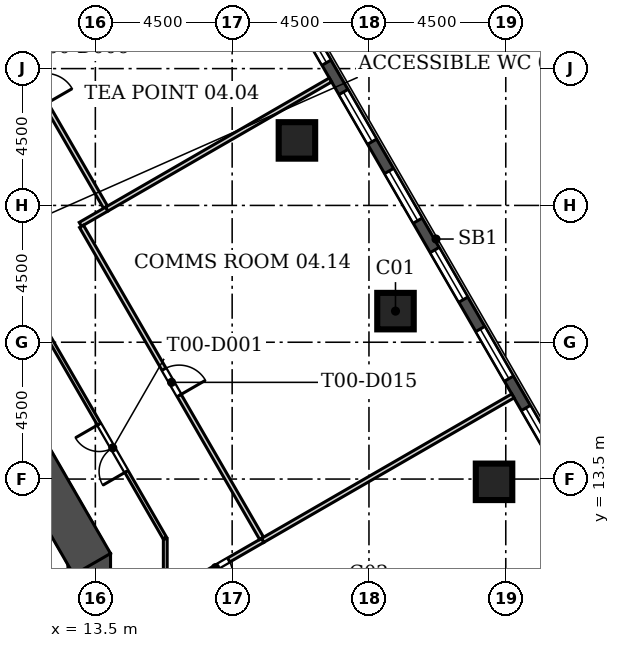
"""IFC4 building model, lengths in metres.
Left out: names, types, materials, properties, quantities, classifications, styles, units other than length and angle.
Written with IfcOpenShell. Run it as: python <this file> out.ifc"""

import sys

from ifc_helpers import new_model, si_unit, direction, frame, frame_2d, origin, origin_2d, place, context, subcontext, project, spatial, rectangle, extrude, element, fill, save


model = new_model("IFC4")
c1 = context("Model", 3, precision=1e-05, world=origin(), true_north=direction((0.0, 1.0)))
c2 = subcontext(c1, "Body", "Model", "MODEL_VIEW")
j1 = project(units=[si_unit("LENGTHUNIT", "METRE"), si_unit("PLANEANGLEUNIT", "RADIAN")], contexts=[c1])
p1 = place(None, origin())
s1 = spatial("IfcSite", under=j1, at=p1, CompositionType="ELEMENT")
p2 = place(p1, origin())
s2 = spatial("IfcBuilding", under=s1, at=p2, CompositionType="ELEMENT")
p3 = place(p2, frame((0.0, 0.0, 25.0)))
s3 = spatial("IfcBuildingStorey", under=s2, at=p3, CompositionType="ELEMENT", Elevation=25.0)
for number, where, z_axis, x_axis in (
    (1, (26.614, 13.409, 0.0), (0.0, 0.0, 1.0), (1.0, 0.0, 0.0)),
    (2, (23.373, 19.024, 0.0), (0.0, 0.0, 1.0), (1.0, 0.0, 0.0)),
    (3, (20.131, 24.638, 0.0), (0.0, 0.0, 1.0), (1.0, 0.0, 0.0)),
):
    element("IfcColumn", number, at=place(p3, frame(where, z_axis=z_axis, x_axis=x_axis)), inside=s3, PredefinedType="COLUMN", context=c2, shape_type="SweptSolid", body=[
        extrude(rectangle(XDim=1.2, YDim=1.2, at=origin_2d()), origin(), (0.0, 0.0, 1.0), 4.5),
    ])
p4 = place(p3, frame((13.3, 0.85, 0.0), z_axis=(0.0, 0.0, 1.0), x_axis=(0.0, 1.0, 0.0)))
e4 = element("IfcWall", 4, at=p4, inside=s3, PredefinedType="SHEAR", context=c2, shape_type="SweptSolid", body=[
    extrude(rectangle(XDim=10.202, YDim=1.4, at=frame_2d((5.101, 0.0))), origin(), (0.0, 0.0, 1.0), 4.5),
])
p5 = place(p4, frame((3.55, 0.0, 0.0)))
e5 = element("IfcOpeningElement", 5, at=p5, cuts=e4, PredefinedType="OPENING", context=c2, shape_type="SweptSolid", body=[
    extrude(rectangle(XDim=1.2, YDim=2.1, at=frame_2d((0.6, 1.05))), frame((0.0, 0.71, 0.0), z_axis=(0.0, -1.0, 0.0), x_axis=(1.0, 0.0, 0.0)), (0.0, 0.0, 1.0), 1.42),
])
p6 = place(p4, frame((7.55, 0.0, 0.0)))
e6 = element("IfcOpeningElement", 6, at=p6, cuts=e4, PredefinedType="OPENING", context=c2, shape_type="SweptSolid", body=[
    extrude(rectangle(XDim=1.2, YDim=2.1, at=frame_2d((0.6, 1.05))), frame((0.0, 0.71, 0.0), z_axis=(0.0, -1.0, 0.0), x_axis=(1.0, 0.0, 0.0)), (0.0, 0.0, 1.0), 1.42),
])
p7 = place(p3, frame((13.394, 10.703, 0.0), z_axis=(0.0, 0.0, 1.0), x_axis=(-0.50000187635, 0.866024320471, 0.0)))
e7 = element("IfcWall", 7, at=p7, inside=s3, PredefinedType="SHEAR", context=c2, shape_type="SweptSolid", body=[
    extrude(rectangle(XDim=9.177, YDim=1.4, at=frame_2d((4.588, 0.0))), origin(), (0.0, 0.0, 1.0), 4.5),
])
p8 = place(p3, frame((32.353, 7.709, 0.0), z_axis=(0.0, 0.0, 1.0), x_axis=(-0.500000836325, 0.866024920931, 0.0)))
e8 = element("IfcWall", 8, at=p8, inside=s3, PredefinedType="SOLIDWALL", context=c2, shape_type="SweptSolid", body=[
    extrude(rectangle(XDim=56.0, YDim=0.34, at=frame_2d((28.0, 0.0))), origin(), (0.0, 0.0, 1.0), 4.2),
])
p9 = place(p8, frame((1.5, 0.0, 0.9)))
e9 = element("IfcOpeningElement", 9, at=p9, cuts=e8, PredefinedType="OPENING", context=c2, shape_type="SweptSolid", body=[
    extrude(rectangle(XDim=1.885, YDim=3.0, at=frame_2d((0.942, 1.5))), frame((0.0, 0.18, 0.0), z_axis=(0.0, -1.0, 0.0), x_axis=(1.0, 0.0, 0.0)), (0.0, 0.0, 1.0), 0.36),
])
p10 = place(p8, frame((4.5, 0.0, 0.9)))
e10 = element("IfcOpeningElement", 10, at=p10, cuts=e8, PredefinedType="OPENING", context=c2, shape_type="SweptSolid", body=[
    extrude(rectangle(XDim=1.885, YDim=3.0, at=frame_2d((0.942, 1.5))), frame((0.0, 0.18, 0.0), z_axis=(0.0, -1.0, 0.0), x_axis=(1.0, 0.0, 0.0)), (0.0, 0.0, 1.0), 0.36),
])
p11 = place(p8, frame((7.5, 0.0, 0.9)))
e11 = element("IfcOpeningElement", 11, at=p11, cuts=e8, PredefinedType="OPENING", context=c2, shape_type="SweptSolid", body=[
    extrude(rectangle(XDim=1.885, YDim=3.0, at=frame_2d((0.942, 1.5))), frame((0.0, 0.18, 0.0), z_axis=(0.0, -1.0, 0.0), x_axis=(1.0, 0.0, 0.0)), (0.0, 0.0, 1.0), 0.36),
])
p12 = place(p8, frame((10.5, 0.0, 0.9)))
e12 = element("IfcOpeningElement", 12, at=p12, cuts=e8, PredefinedType="OPENING", context=c2, shape_type="SweptSolid", body=[
    extrude(rectangle(XDim=1.885, YDim=3.0, at=frame_2d((0.942, 1.5))), frame((0.0, 0.18, 0.0), z_axis=(0.0, -1.0, 0.0), x_axis=(1.0, 0.0, 0.0)), (0.0, 0.0, 1.0), 0.36),
])
p13 = place(p8, frame((13.5, 0.0, 0.9)))
e13 = element("IfcOpeningElement", 13, at=p13, cuts=e8, PredefinedType="OPENING", context=c2, shape_type="SweptSolid", body=[
    extrude(rectangle(XDim=1.885, YDim=3.0, at=frame_2d((0.942, 1.5))), frame((0.0, 0.18, 0.0), z_axis=(0.0, -1.0, 0.0), x_axis=(1.0, 0.0, 0.0)), (0.0, 0.0, 1.0), 0.36),
])
p14 = place(p8, frame((16.5, 0.0, 0.9)))
e14 = element("IfcOpeningElement", 14, at=p14, cuts=e8, PredefinedType="OPENING", context=c2, shape_type="SweptSolid", body=[
    extrude(rectangle(XDim=1.885, YDim=3.0, at=frame_2d((0.942, 1.5))), frame((0.0, 0.18, 0.0), z_axis=(0.0, -1.0, 0.0), x_axis=(1.0, 0.0, 0.0)), (0.0, 0.0, 1.0), 0.36),
])
p15 = place(p8, frame((19.5, 0.0, 0.9)))
e15 = element("IfcOpeningElement", 15, at=p15, cuts=e8, PredefinedType="OPENING", context=c2, shape_type="SweptSolid", body=[
    extrude(rectangle(XDim=1.885, YDim=3.0, at=frame_2d((0.942, 1.5))), frame((0.0, 0.18, 0.0), z_axis=(0.0, -1.0, 0.0), x_axis=(1.0, 0.0, 0.0)), (0.0, 0.0, 1.0), 0.36),
])
p16 = place(p8, frame((22.5, 0.0, 0.9)))
e16 = element("IfcOpeningElement", 16, at=p16, cuts=e8, PredefinedType="OPENING", context=c2, shape_type="SweptSolid", body=[
    extrude(rectangle(XDim=1.885, YDim=3.0, at=frame_2d((0.942, 1.5))), frame((0.0, 0.18, 0.0), z_axis=(0.0, -1.0, 0.0), x_axis=(1.0, 0.0, 0.0)), (0.0, 0.0, 1.0), 0.36),
])
p17 = place(p8, frame((25.5, 0.0, 0.9)))
e17 = element("IfcOpeningElement", 17, at=p17, cuts=e8, PredefinedType="OPENING", context=c2, shape_type="SweptSolid", body=[
    extrude(rectangle(XDim=1.885, YDim=3.0, at=frame_2d((0.942, 1.5))), frame((0.0, 0.18, 0.0), z_axis=(0.0, -1.0, 0.0), x_axis=(1.0, 0.0, 0.0)), (0.0, 0.0, 1.0), 0.36),
])
p18 = place(p8, frame((28.5, 0.0, 0.9)))
e18 = element("IfcOpeningElement", 18, at=p18, cuts=e8, PredefinedType="OPENING", context=c2, shape_type="SweptSolid", body=[
    extrude(rectangle(XDim=1.885, YDim=3.0, at=frame_2d((0.942, 1.5))), frame((0.0, 0.18, 0.0), z_axis=(0.0, -1.0, 0.0), x_axis=(1.0, 0.0, 0.0)), (0.0, 0.0, 1.0), 0.36),
])
p19 = place(p8, frame((31.5, 0.0, 0.0)))
e19 = element("IfcOpeningElement", 19, at=p19, cuts=e8, PredefinedType="OPENING", context=c2, shape_type="SweptSolid", body=[
    extrude(rectangle(XDim=1.885, YDim=2.6, at=frame_2d((0.942, 1.3))), frame((0.0, 0.18, 0.0), z_axis=(0.0, -1.0, 0.0), x_axis=(1.0, 0.0, 0.0)), (0.0, 0.0, 1.0), 0.36),
])
p20 = place(p8, frame((34.5, 0.0, 0.9)))
e20 = element("IfcOpeningElement", 20, at=p20, cuts=e8, PredefinedType="OPENING", context=c2, shape_type="SweptSolid", body=[
    extrude(rectangle(XDim=1.885, YDim=3.0, at=frame_2d((0.942, 1.5))), frame((0.0, 0.18, 0.0), z_axis=(0.0, -1.0, 0.0), x_axis=(1.0, 0.0, 0.0)), (0.0, 0.0, 1.0), 0.36),
])
p21 = place(p8, frame((37.5, 0.0, 0.9)))
e21 = element("IfcOpeningElement", 21, at=p21, cuts=e8, PredefinedType="OPENING", context=c2, shape_type="SweptSolid", body=[
    extrude(rectangle(XDim=1.885, YDim=3.0, at=frame_2d((0.942, 1.5))), frame((0.0, 0.18, 0.0), z_axis=(0.0, -1.0, 0.0), x_axis=(1.0, 0.0, 0.0)), (0.0, 0.0, 1.0), 0.36),
])
p22 = place(p8, frame((40.5, 0.0, 0.9)))
e22 = element("IfcOpeningElement", 22, at=p22, cuts=e8, PredefinedType="OPENING", context=c2, shape_type="SweptSolid", body=[
    extrude(rectangle(XDim=1.885, YDim=3.0, at=frame_2d((0.942, 1.5))), frame((0.0, 0.18, 0.0), z_axis=(0.0, -1.0, 0.0), x_axis=(1.0, 0.0, 0.0)), (0.0, 0.0, 1.0), 0.36),
])
p23 = place(p8, frame((43.5, 0.0, 0.9)))
e23 = element("IfcOpeningElement", 23, at=p23, cuts=e8, PredefinedType="OPENING", context=c2, shape_type="SweptSolid", body=[
    extrude(rectangle(XDim=1.885, YDim=3.0, at=frame_2d((0.942, 1.5))), frame((0.0, 0.18, 0.0), z_axis=(0.0, -1.0, 0.0), x_axis=(1.0, 0.0, 0.0)), (0.0, 0.0, 1.0), 0.36),
])
p24 = place(p8, frame((46.5, 0.0, 0.9)))
e24 = element("IfcOpeningElement", 24, at=p24, cuts=e8, PredefinedType="OPENING", context=c2, shape_type="SweptSolid", body=[
    extrude(rectangle(XDim=1.885, YDim=3.0, at=frame_2d((0.942, 1.5))), frame((0.0, 0.18, 0.0), z_axis=(0.0, -1.0, 0.0), x_axis=(1.0, 0.0, 0.0)), (0.0, 0.0, 1.0), 0.36),
])
p25 = place(p8, frame((49.5, 0.0, 0.9)))
e25 = element("IfcOpeningElement", 25, at=p25, cuts=e8, PredefinedType="OPENING", context=c2, shape_type="SweptSolid", body=[
    extrude(rectangle(XDim=1.885, YDim=3.0, at=frame_2d((0.942, 1.5))), frame((0.0, 0.18, 0.0), z_axis=(0.0, -1.0, 0.0), x_axis=(1.0, 0.0, 0.0)), (0.0, 0.0, 1.0), 0.36),
])
p26 = place(p8, frame((52.5, 0.0, 0.9)))
e26 = element("IfcOpeningElement", 26, at=p26, cuts=e8, PredefinedType="OPENING", context=c2, shape_type="SweptSolid", body=[
    extrude(rectangle(XDim=1.885, YDim=3.0, at=frame_2d((0.942, 1.5))), frame((0.0, 0.18, 0.0), z_axis=(0.0, -1.0, 0.0), x_axis=(1.0, 0.0, 0.0)), (0.0, 0.0, 1.0), 0.36),
])
p27 = place(p3, frame((11.062, 19.74, 0.0), z_axis=(0.0, 0.0, 1.0), x_axis=(0.499995462694, -0.866028023383, 0.0)))
e27 = element("IfcWall", 27, at=p27, inside=s3, PredefinedType="PARTITIONING", context=c2, shape_type="SweptSolid", body=[
    extrude(rectangle(XDim=9.444, YDim=0.125, at=frame_2d((4.722, 0.0))), origin(), (0.0, 0.0, 1.0), 4.2),
])
p28 = place(p27, frame((5.121, 0.0, 0.0)))
e28 = element("IfcOpeningElement", 28, at=p28, cuts=e27, PredefinedType="OPENING", context=c2, shape_type="SweptSolid", body=[
    extrude(rectangle(XDim=1.8, YDim=2.1, at=frame_2d((0.9, 1.05))), frame((0.0, 0.073, 0.0), z_axis=(0.0, -1.0, 0.0), x_axis=(1.0, 0.0, 0.0)), (0.0, 0.0, 1.0), 0.145),
])
p29 = place(p3, frame((15.8, 11.535, 0.0), z_axis=(0.0, 0.0, 1.0), x_axis=(0.0, -1.0, 0.0)))
e29 = element("IfcWall", 29, at=p29, inside=s3, PredefinedType="PARTITIONING", context=c2, shape_type="SweptSolid", body=[
    extrude(rectangle(XDim=1.902, YDim=0.125, at=frame_2d((0.951, 0.0))), origin(), (0.0, 0.0, 1.0), 4.2),
])
p30 = place(p3, frame((13.836, 22.442, 0.0), z_axis=(0.0, 0.0, 1.0), x_axis=(-0.500005027614, 0.86602250107, 0.0)))
e30 = element("IfcWall", 30, at=p30, inside=s3, PredefinedType="PARTITIONING", context=c2, shape_type="SweptSolid", body=[
    extrude(rectangle(XDim=8.85, YDim=0.15, at=frame_2d((4.425, 0.0))), origin(), (0.0, 0.0, 1.0), 4.2),
])
p31 = place(p30, frame((3.925, 0.0, 0.0)))
e31 = element("IfcOpeningElement", 31, at=p31, cuts=e30, PredefinedType="OPENING", context=c2, shape_type="SweptSolid", body=[
    extrude(rectangle(XDim=1.0, YDim=2.1, at=frame_2d((0.5, 1.05))), frame((0.0, 0.085, 0.0), z_axis=(0.0, -1.0, 0.0), x_axis=(1.0, 0.0, 0.0)), (0.0, 0.0, 1.0), 0.17),
])
p32 = place(p3, frame((21.234, 26.627, 0.0), z_axis=(0.0, 0.0, 1.0), x_axis=(-0.866028703517, -0.499994284652, 0.0)))
e32 = element("IfcWall", 32, at=p32, inside=s3, PredefinedType="PARTITIONING", context=c2, shape_type="SweptSolid", body=[
    extrude(rectangle(XDim=8.5, YDim=0.15, at=frame_2d((4.25, 0.0))), origin(), (0.0, 0.0, 1.0), 4.2),
])
p33 = place(p3, frame((19.007, 11.485, 0.0), z_axis=(0.0, 0.0, 1.0), x_axis=(-0.866048453834, -0.499960074017, 0.0)))
e33 = element("IfcWall", 33, at=p33, inside=s3, PredefinedType="PARTITIONING", context=c2, shape_type="SweptSolid", body=[
    extrude(rectangle(XDim=3.587, YDim=0.15, at=frame_2d((1.793, 0.0))), origin(), (0.0, 0.0, 1.0), 4.2),
])
p34 = place(p33, frame((1.294, 0.0, 0.0)))
e34 = element("IfcOpeningElement", 34, at=p34, cuts=e33, PredefinedType="OPENING", context=c2, shape_type="SweptSolid", body=[
    extrude(rectangle(XDim=1.0, YDim=2.1, at=frame_2d((0.5, 1.05))), frame((0.0, 0.085, 0.0), z_axis=(0.0, -1.0, 0.0), x_axis=(1.0, 0.0, 0.0)), (0.0, 0.0, 1.0), 0.17),
])
p35 = place(p3, frame((13.873, 22.377, 0.0), z_axis=(0.0, 0.0, 1.0), x_axis=(-0.866010750942, -0.50002537861, 0.0)))
e35 = element("IfcWall", 35, at=p35, inside=s3, PredefinedType="PARTITIONING", context=c2, shape_type="SweptSolid", body=[
    extrude(rectangle(XDim=1.0, YDim=0.15, at=frame_2d((0.5, 0.0))), origin(), (0.0, 0.0, 1.0), 4.2),
])
p36 = place(p3, frame((13.045, 21.812, 0.0), z_axis=(0.0, 0.0, 1.0), x_axis=(0.499994727438, -0.866028447878, 0.0)))
e36 = element("IfcWall", 36, at=p36, inside=s3, PredefinedType="PARTITIONING", context=c2, shape_type="SweptSolid", body=[
    extrude(rectangle(XDim=11.85, YDim=0.15, at=frame_2d((5.925, 0.0))), origin(), (0.0, 0.0, 1.0), 4.2),
])
p37 = place(p36, frame((5.425, 0.0, 0.0)))
e37 = element("IfcOpeningElement", 37, at=p37, cuts=e36, PredefinedType="OPENING", context=c2, shape_type="SweptSolid", body=[
    extrude(rectangle(XDim=1.0, YDim=2.1, at=frame_2d((0.5, 1.05))), frame((0.0, 0.085, 0.0), z_axis=(0.0, -1.0, 0.0), x_axis=(1.0, 0.0, 0.0)), (0.0, 0.0, 1.0), 0.17),
])
p38 = place(p3, frame((19.007, 11.485, 0.0), z_axis=(0.0, 0.0, 1.0), x_axis=(0.86602681393, 0.499997557548, 0.0)))
e38 = element("IfcWall", 38, at=p38, inside=s3, PredefinedType="PARTITIONING", context=c2, shape_type="SweptSolid", body=[
    extrude(rectangle(XDim=9.5, YDim=0.15, at=frame_2d((4.75, 0.0))), origin(), (0.0, 0.0, 1.0), 4.2),
])
p39 = place(p11, origin())
e39 = element("IfcWindow", 39, at=p39, inside=s3, PartitioningType="SINGLE_PANEL", PredefinedType="WINDOW", context=c2, shape_type="SweptSolid", body=[
    extrude(rectangle(XDim=1.885, YDim=3.0, at=frame_2d((0.942, 1.5))), frame((0.0, 0.11, 0.0), z_axis=(0.0, -1.0, 0.0), x_axis=(1.0, 0.0, 0.0)), (0.0, 0.0, 1.0), 0.06),
])
fill(e11, e39)
p40 = place(p12, origin())
e40 = element("IfcWindow", 40, at=p40, inside=s3, PartitioningType="SINGLE_PANEL", PredefinedType="WINDOW", context=c2, shape_type="SweptSolid", body=[
    extrude(rectangle(XDim=1.885, YDim=3.0, at=frame_2d((0.942, 1.5))), frame((0.0, 0.11, 0.0), z_axis=(0.0, -1.0, 0.0), x_axis=(1.0, 0.0, 0.0)), (0.0, 0.0, 1.0), 0.06),
])
fill(e12, e40)
p41 = place(p13, origin())
e41 = element("IfcWindow", 41, at=p41, inside=s3, PartitioningType="SINGLE_PANEL", PredefinedType="WINDOW", context=c2, shape_type="SweptSolid", body=[
    extrude(rectangle(XDim=1.885, YDim=3.0, at=frame_2d((0.942, 1.5))), frame((0.0, 0.11, 0.0), z_axis=(0.0, -1.0, 0.0), x_axis=(1.0, 0.0, 0.0)), (0.0, 0.0, 1.0), 0.06),
])
fill(e13, e41)
p42 = place(p14, origin())
e42 = element("IfcWindow", 42, at=p42, inside=s3, PartitioningType="SINGLE_PANEL", PredefinedType="WINDOW", context=c2, shape_type="SweptSolid", body=[
    extrude(rectangle(XDim=1.885, YDim=3.0, at=frame_2d((0.942, 1.5))), frame((0.0, 0.11, 0.0), z_axis=(0.0, -1.0, 0.0), x_axis=(1.0, 0.0, 0.0)), (0.0, 0.0, 1.0), 0.06),
])
fill(e14, e42)
p43 = place(p15, origin())
e43 = element("IfcWindow", 43, at=p43, inside=s3, PartitioningType="SINGLE_PANEL", PredefinedType="WINDOW", context=c2, shape_type="SweptSolid", body=[
    extrude(rectangle(XDim=1.885, YDim=3.0, at=frame_2d((0.942, 1.5))), frame((0.0, 0.11, 0.0), z_axis=(0.0, -1.0, 0.0), x_axis=(1.0, 0.0, 0.0)), (0.0, 0.0, 1.0), 0.06),
])
fill(e15, e43)
p44 = place(p16, origin())
e44 = element("IfcWindow", 44, at=p44, inside=s3, PartitioningType="SINGLE_PANEL", PredefinedType="WINDOW", context=c2, shape_type="SweptSolid", body=[
    extrude(rectangle(XDim=1.885, YDim=3.0, at=frame_2d((0.942, 1.5))), frame((0.0, 0.11, 0.0), z_axis=(0.0, -1.0, 0.0), x_axis=(1.0, 0.0, 0.0)), (0.0, 0.0, 1.0), 0.06),
])
fill(e16, e44)
p45 = place(p28, frame((1.8, 0.0, 0.0), z_axis=(0.0, 0.0, 1.0), x_axis=(-1.0, 0.0, 0.0)))
e45 = element("IfcDoor", 45, at=p45, inside=s3, OperationType="DOUBLE_DOOR_SINGLE_SWING", PredefinedType="DOOR", context=c2, shape_type="SweptSolid", body=[
    extrude(rectangle(XDim=1.8, YDim=2.1, at=frame_2d((0.9, 1.05))), frame((0.0, 0.025, 0.0), z_axis=(0.0, -1.0, 0.0), x_axis=(1.0, 0.0, 0.0)), (0.0, 0.0, 1.0), 0.05),
])
fill(e28, e45)
p46 = place(p34, origin())
e46 = element("IfcDoor", 46, at=p46, inside=s3, OperationType="SINGLE_SWING_RIGHT", PredefinedType="DOOR", context=c2, shape_type="SweptSolid", body=[
    extrude(rectangle(XDim=1.0, YDim=2.1, at=frame_2d((0.5, 1.05))), frame((0.0, 0.025, 0.0), z_axis=(0.0, -1.0, 0.0), x_axis=(1.0, 0.0, 0.0)), (0.0, 0.0, 1.0), 0.05),
])
fill(e34, e46)
p47 = place(p37, origin())
e47 = element("IfcDoor", 47, at=p47, inside=s3, OperationType="SINGLE_SWING_RIGHT", PredefinedType="DOOR", context=c2, shape_type="SweptSolid", body=[
    extrude(rectangle(XDim=1.0, YDim=2.1, at=frame_2d((0.5, 1.05))), frame((0.0, 0.025, 0.0), z_axis=(0.0, -1.0, 0.0), x_axis=(1.0, 0.0, 0.0)), (0.0, 0.0, 1.0), 0.05),
])
fill(e37, e47)
save(model, sys.argv[1])
